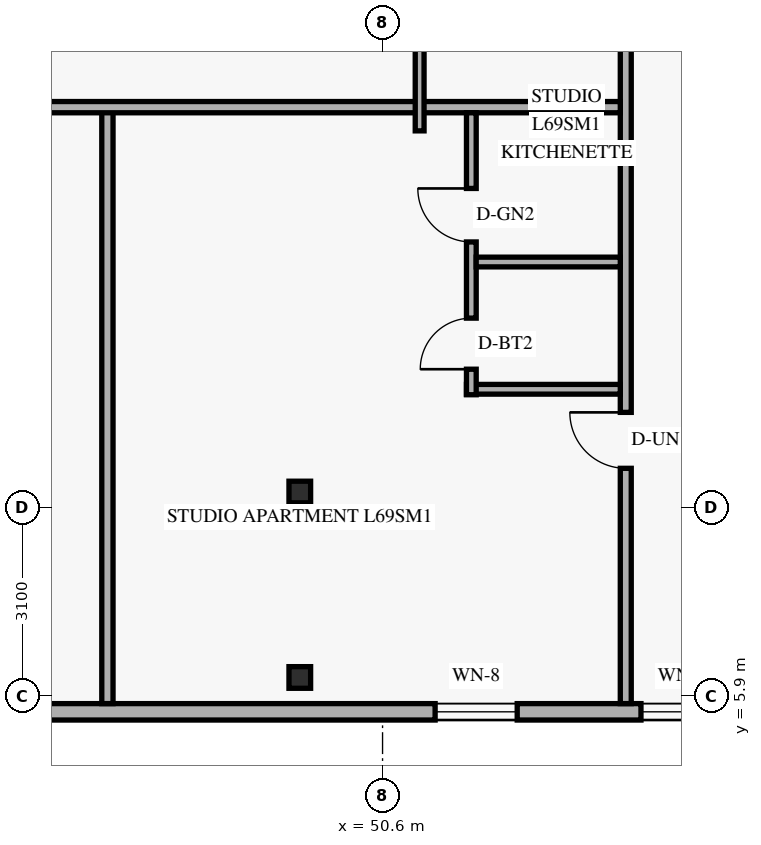
"""IFC4 building model, lengths in metres.
Left out: names, types, materials, properties, quantities, classifications, styles, units other than length and angle.
Written with IfcOpenShell. Run it as: python <this file> out.ifc"""

import sys

from ifc_helpers import new_model, si_unit, direction, frame, frame_2d, origin, origin_2d, place, context, subcontext, project, spatial, rectangle, hollow_rectangle, extrude, element, fill, save


model = new_model("IFC4")
c1 = context("Model", 3, precision=1e-05, world=origin(), true_north=direction((0.0, 1.0)))
c2 = subcontext(c1, "Body", "Model", "MODEL_VIEW")
j1 = project(units=[si_unit("LENGTHUNIT", "METRE"), si_unit("PLANEANGLEUNIT", "RADIAN")], contexts=[c1])
p1 = place(None, origin())
s1 = spatial("IfcSite", under=j1, at=p1, CompositionType="ELEMENT")
p2 = place(p1, origin())
s2 = spatial("IfcBuilding", under=s1, at=p2, CompositionType="ELEMENT")
p3 = place(p2, frame((0.0, 0.0, 264.0)))
s3 = spatial("IfcBuildingStorey", under=s2, at=p3, CompositionType="ELEMENT", Elevation=264.0)
for number, where, z_axis, x_axis in (
    (1, (49.176, 6.2, 0.0), (0.035, 0.0, 0.999), (0.0, 1.0, 0.0)),
    (2, (49.176, 9.25, 0.0), (0.035, 0.0, 0.999), (0.0, 1.0, 0.0)),
):
    element("IfcColumn", number, at=place(p3, frame(where, z_axis=z_axis, x_axis=x_axis)), inside=s3, PredefinedType="COLUMN", context=c2, shape_type="SweptSolid", body=[
        extrude(hollow_rectangle(XDim=0.356, YDim=0.356, WallThickness=0.016, at=origin_2d()), origin(), (0.0, 0.0, 1.0), 3.602),
    ])
p4 = place(p3, frame((25.82, 5.635, 0.0), z_axis=(0.0, 0.0, 1.0), x_axis=(1.0, 0.0, 0.0)))
e3 = element("IfcWall", 3, at=p4, inside=s3, PredefinedType="SOLIDWALL", context=c2, shape_type="SweptSolid", body=[
    extrude(rectangle(XDim=32.96, YDim=0.27, at=frame_2d((16.48, 0.0))), origin(), (0.0, 0.0, 1.0), 3.36),
])
p5 = place(p4, frame((14.363, 0.0, 0.85)))
e4 = element("IfcOpeningElement", 4, at=p5, cuts=e3, PredefinedType="OPENING", context=c2, shape_type="SweptSolid", body=[
    extrude(rectangle(XDim=1.35, YDim=1.55, at=frame_2d((0.675, 0.775))), frame((0.0, 0.145, 0.0), z_axis=(0.0, -1.0, 0.0), x_axis=(1.0, 0.0, 0.0)), (0.0, 0.0, 1.0), 0.29),
])
p6 = place(p4, frame((25.645, 0.0, 0.85)))
e5 = element("IfcOpeningElement", 5, at=p6, cuts=e3, PredefinedType="OPENING", context=c2, shape_type="SweptSolid", body=[
    extrude(rectangle(XDim=1.35, YDim=1.55, at=frame_2d((0.675, 0.775))), frame((0.0, 0.145, 0.0), z_axis=(0.0, -1.0, 0.0), x_axis=(1.0, 0.0, 0.0)), (0.0, 0.0, 1.0), 0.29),
])
p7 = place(p4, frame((29.03, 0.0, 0.85)))
e6 = element("IfcOpeningElement", 6, at=p7, cuts=e3, PredefinedType="OPENING", context=c2, shape_type="SweptSolid", body=[
    extrude(rectangle(XDim=1.35, YDim=1.55, at=frame_2d((0.675, 0.775))), frame((0.0, 0.145, 0.0), z_axis=(0.0, -1.0, 0.0), x_axis=(1.0, 0.0, 0.0)), (0.0, 0.0, 1.0), 0.29),
])
p8 = place(p3, frame((54.6, 5.77, 0.0), z_axis=(0.0, 0.0, 1.0), x_axis=(0.0, 1.0, 0.0)))
e7 = element("IfcWall", 7, at=p8, inside=s3, PredefinedType="STANDARD", context=c2, shape_type="SweptSolid", body=[
    extrude(rectangle(XDim=19.23, YDim=0.18, at=frame_2d((9.615, 0.0))), origin(), (0.0, 0.0, 1.0), 2.803),
])
p9 = place(p8, frame((3.87, 0.0, 0.0)))
e8 = element("IfcOpeningElement", 8, at=p9, cuts=e7, PredefinedType="OPENING", context=c2, shape_type="SweptSolid", body=[
    extrude(rectangle(XDim=0.92, YDim=2.15, at=frame_2d((0.46, 1.075))), frame((0.0, 0.1, 0.0), z_axis=(0.0, -1.0, 0.0), x_axis=(1.0, 0.0, 0.0)), (0.0, 0.0, 1.0), 0.2),
])
p10 = place(p3, frame((46.075, 5.77, 0.0), z_axis=(0.0, 0.0, 1.0), x_axis=(0.0, 1.0, 0.0)))
e9 = element("IfcWall", 9, at=p10, inside=s3, PredefinedType="PARTITIONING", context=c2, shape_type="SweptSolid", body=[
    extrude(rectangle(XDim=9.81, YDim=0.185, at=frame_2d((4.905, 0.0))), origin(), (0.0, 0.0, 1.0), 2.803),
])
p11 = place(p3, frame((37.64, 15.58, 0.0), z_axis=(0.0, 0.0, 1.0), x_axis=(1.0, 0.0, 0.0)))
e10 = element("IfcWall", 10, at=p11, inside=s3, PredefinedType="PARTITIONING", context=c2, shape_type="SweptSolid", body=[
    extrude(rectangle(XDim=16.87, YDim=0.185, at=frame_2d((8.435, 0.0))), origin(), (0.0, 0.0, 1.0), 2.803),
])
p12 = place(p3, frame((51.98, 10.94, 0.0), z_axis=(0.0, 0.0, 1.0), x_axis=(1.0, 0.0, 0.0)))
e11 = element("IfcWall", 11, at=p12, inside=s3, PredefinedType="PLUMBINGWALL", context=c2, shape_type="SweptSolid", body=[
    extrude(rectangle(XDim=2.53, YDim=0.16, at=frame_2d((1.265, 0.0))), origin(), (0.0, 0.0, 1.0), 3.36),
])
p13 = place(p3, frame((52.06, 10.85, 0.0), z_axis=(0.0, 0.0, 1.0), x_axis=(0.0, 1.0, 0.0)))
e12 = element("IfcWall", 12, at=p13, inside=s3, PredefinedType="PLUMBINGWALL", context=c2, shape_type="SweptSolid", body=[
    extrude(rectangle(XDim=4.637, YDim=0.16, at=frame_2d((2.319, 0.0))), origin(), (0.0, 0.0, 1.0), 3.039),
])
p14 = place(p13, frame((0.42, 0.0, 0.0)))
e13 = element("IfcOpeningElement", 13, at=p14, cuts=e12, PredefinedType="OPENING", context=c2, shape_type="SweptSolid", body=[
    extrude(rectangle(XDim=0.84, YDim=2.12, at=frame_2d((0.42, 1.06))), frame((0.0, 0.09, 0.0), z_axis=(0.0, -1.0, 0.0), x_axis=(1.0, 0.0, 0.0)), (0.0, 0.0, 1.0), 0.18),
])
p15 = place(p13, frame((2.513, 0.0, 0.0)))
e14 = element("IfcOpeningElement", 14, at=p15, cuts=e12, PredefinedType="OPENING", context=c2, shape_type="SweptSolid", body=[
    extrude(rectangle(XDim=0.88, YDim=2.12, at=frame_2d((0.44, 1.06))), frame((0.0, 0.09, 0.0), z_axis=(0.0, -1.0, 0.0), x_axis=(1.0, 0.0, 0.0)), (0.0, 0.0, 1.0), 0.18),
])
p16 = place(p3, frame((52.14, 13.033, 0.0), z_axis=(0.0, 0.0, 1.0), x_axis=(1.0, 0.0, 0.0)))
e15 = element("IfcWall", 15, at=p16, inside=s3, PredefinedType="PLUMBINGWALL", context=c2, shape_type="SweptSolid", body=[
    extrude(rectangle(XDim=2.37, YDim=0.16, at=frame_2d((1.185, 0.0))), origin(), (0.0, 0.0, 1.0), 3.36),
])
p17 = place(p3, frame((51.21, 15.19, 0.0), z_axis=(0.0, 0.0, 1.0), x_axis=(0.0, 1.0, 0.0)))
e16 = element("IfcWall", 16, at=p17, inside=s3, PredefinedType="PARTITIONING", context=c2, shape_type="SweptSolid", body=[
    extrude(rectangle(XDim=9.72, YDim=0.145, at=frame_2d((4.86, 0.0))), origin(), (0.0, 0.0, 1.0), 2.803),
])
p18 = place(p17, frame((2.445, 0.0, 0.0)))
e17 = element("IfcOpeningElement", 17, at=p18, cuts=e16, PredefinedType="OPENING", context=c2, shape_type="SweptSolid", body=[
    extrude(rectangle(XDim=0.88, YDim=2.14, at=frame_2d((0.44, 1.07))), frame((0.0, 0.083, 0.0), z_axis=(0.0, -1.0, 0.0), x_axis=(1.0, 0.0, 0.0)), (0.0, 0.0, 1.0), 0.165),
])
p19 = place(p17, frame((5.84, 0.0, 0.0)))
e18 = element("IfcOpeningElement", 18, at=p19, cuts=e16, PredefinedType="OPENING", context=c2, shape_type="SweptSolid", body=[
    extrude(rectangle(XDim=0.88, YDim=2.12, at=frame_2d((0.44, 1.06))), frame((0.0, 0.083, 0.0), z_axis=(0.0, -1.0, 0.0), x_axis=(1.0, 0.0, 0.0)), (0.0, 0.0, 1.0), 0.165),
])
p20 = place(p6, origin())
e19 = element("IfcWindow", 19, at=p20, inside=s3, PartitioningType="SINGLE_PANEL", PredefinedType="WINDOW", context=c2, shape_type="SweptSolid", body=[
    extrude(rectangle(XDim=1.35, YDim=1.55, at=frame_2d((0.675, 0.775))), frame((0.0, 0.03, 0.0), z_axis=(0.0, -1.0, 0.0), x_axis=(1.0, 0.0, 0.0)), (0.0, 0.0, 1.0), 0.06),
])
fill(e5, e19)
p21 = place(p7, origin())
e20 = element("IfcWindow", 20, at=p21, inside=s3, PartitioningType="SINGLE_PANEL", PredefinedType="WINDOW", context=c2, shape_type="SweptSolid", body=[
    extrude(rectangle(XDim=1.35, YDim=1.55, at=frame_2d((0.675, 0.775))), frame((0.0, 0.03, 0.0), z_axis=(0.0, -1.0, 0.0), x_axis=(1.0, 0.0, 0.0)), (0.0, 0.0, 1.0), 0.06),
])
fill(e6, e20)
p22 = place(p9, origin())
e21 = element("IfcDoor", 21, at=p22, inside=s3, OperationType="SINGLE_SWING_RIGHT", PredefinedType="DOOR", context=c2, shape_type="SweptSolid", body=[
    extrude(rectangle(XDim=0.92, YDim=2.15, at=frame_2d((0.46, 1.075))), frame((0.0, 0.025, 0.0), z_axis=(0.0, -1.0, 0.0), x_axis=(1.0, 0.0, 0.0)), (0.0, 0.0, 1.0), 0.05),
])
fill(e8, e21)
p23 = place(p14, origin())
e22 = element("IfcDoor", 22, at=p23, inside=s3, OperationType="SINGLE_SWING_LEFT", PredefinedType="DOOR", context=c2, shape_type="SweptSolid", body=[
    extrude(rectangle(XDim=0.84, YDim=2.12, at=frame_2d((0.42, 1.06))), frame((0.0, 0.025, 0.0), z_axis=(0.0, -1.0, 0.0), x_axis=(1.0, 0.0, 0.0)), (0.0, 0.0, 1.0), 0.05),
])
fill(e13, e22)
p24 = place(p15, origin())
e23 = element("IfcDoor", 23, at=p24, inside=s3, OperationType="SINGLE_SWING_RIGHT", PredefinedType="DOOR", context=c2, shape_type="SweptSolid", body=[
    extrude(rectangle(XDim=0.88, YDim=2.12, at=frame_2d((0.44, 1.06))), frame((0.0, 0.025, 0.0), z_axis=(0.0, -1.0, 0.0), x_axis=(1.0, 0.0, 0.0)), (0.0, 0.0, 1.0), 0.05),
])
fill(e14, e23)
save(model, sys.argv[1])
